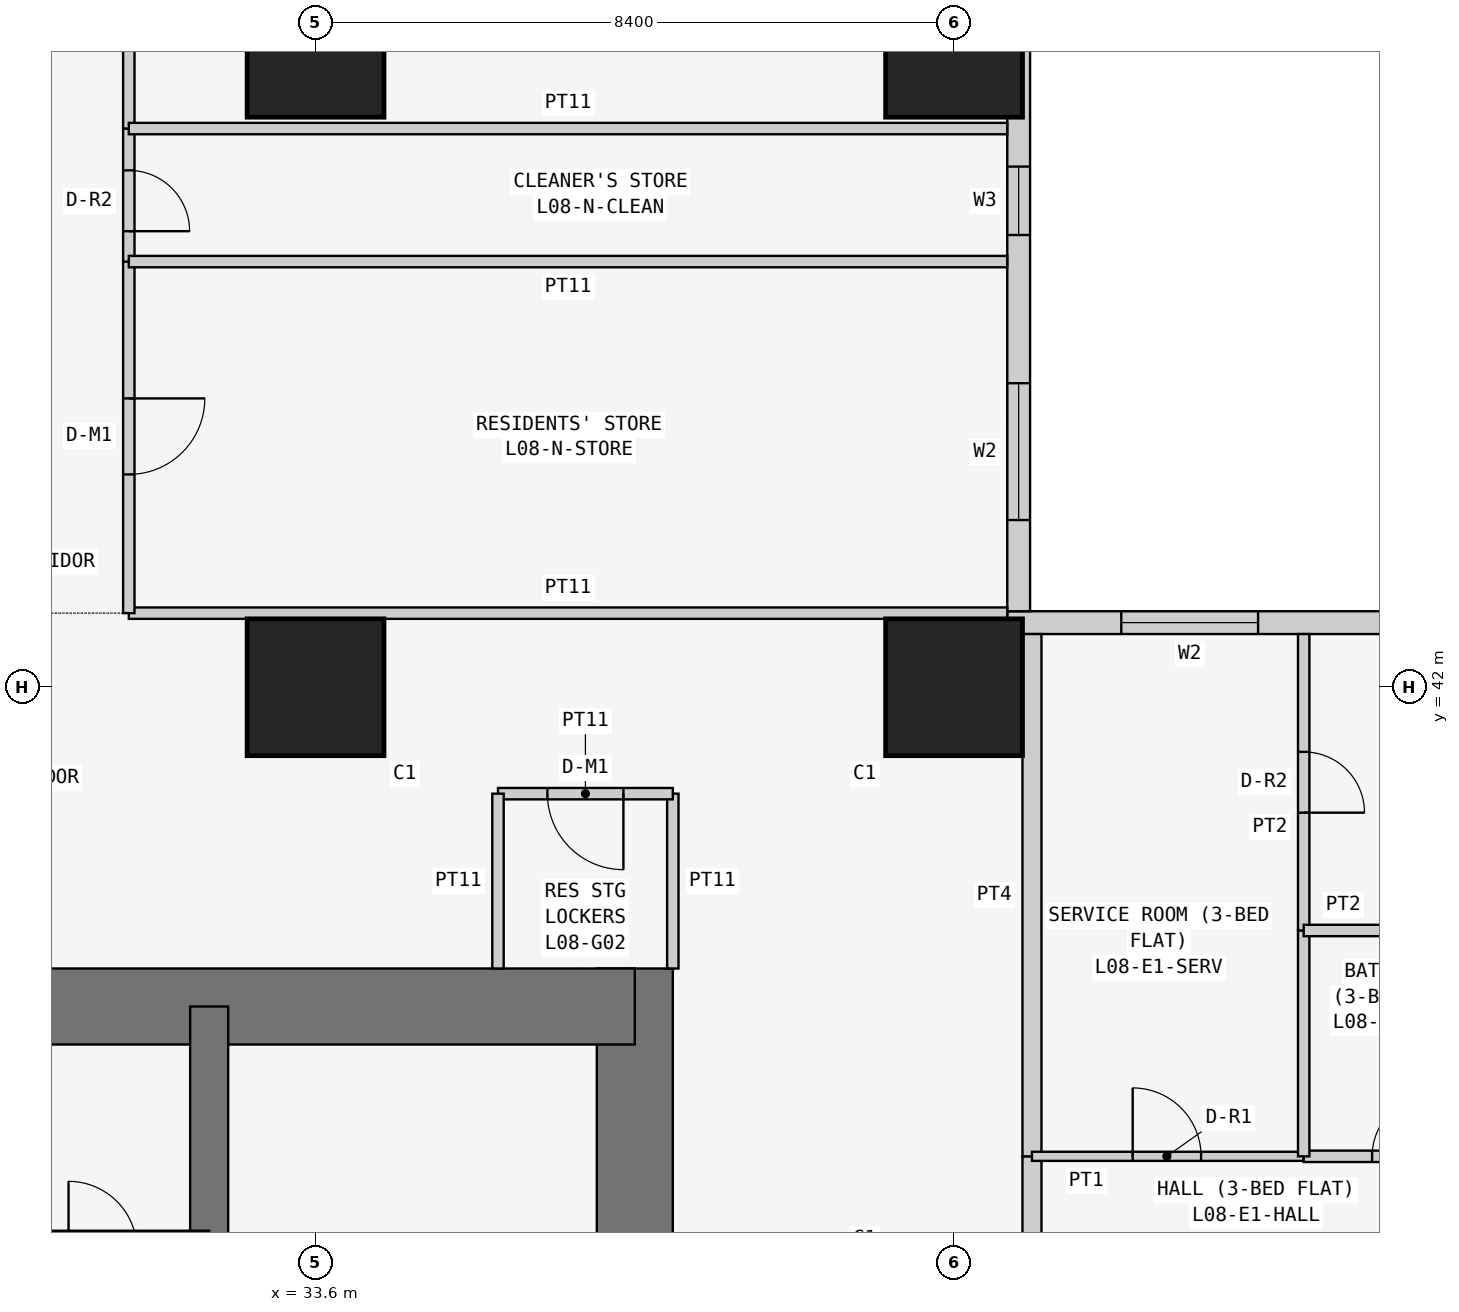
"""IFC4 building model, lengths in metres.
Left out: names, types, materials, properties, quantities, classifications, styles, units other than length and angle.
Written with IfcOpenShell. Run it as: python <this file> out.ifc"""

import sys

from ifc_helpers import new_model, si_unit, direction, frame, frame_2d, origin, origin_2d, place, context, subcontext, project, spatial, rectangle, extrude, element, fill, save


model = new_model("IFC4")
c1 = context("Model", 3, precision=1e-05, world=origin(), true_north=direction((0.0, 1.0)))
c2 = subcontext(c1, "Body", "Model", "MODEL_VIEW")
j1 = project(units=[si_unit("LENGTHUNIT", "METRE"), si_unit("PLANEANGLEUNIT", "RADIAN")], contexts=[c1])
p1 = place(None, origin())
s1 = spatial("IfcSite", under=j1, at=p1, CompositionType="ELEMENT")
p2 = place(p1, origin())
s2 = spatial("IfcBuilding", under=s1, at=p2, CompositionType="ELEMENT")
p3 = place(p2, frame((0.0, 0.0, 38.1)))
s3 = spatial("IfcBuildingStorey", under=s2, at=p3, CompositionType="ELEMENT", Elevation=38.1)
for number, where, z_axis, x_axis in (
    (1, (33.6, 42.0, 0.0), (0.0, 0.0, 1.0), (1.0, 0.0, 0.0)),
    (2, (33.6, 50.4, 0.0), (0.0, 0.0, 1.0), (1.0, 0.0, 0.0)),
    (3, (42.0, 42.0, 0.0), (0.0, 0.0, 1.0), (1.0, 0.0, 0.0)),
    (4, (42.0, 50.4, 0.0), (0.0, 0.0, 1.0), (1.0, 0.0, 0.0)),
):
    element("IfcColumn", number, at=place(p3, frame(where, z_axis=z_axis, x_axis=x_axis)), inside=s3, PredefinedType="COLUMN", context=c2, shape_type="SweptSolid", body=[
        extrude(rectangle(XDim=1.8, YDim=1.8, at=origin_2d()), origin(), (0.0, 0.0, 1.0), 3.6),
    ])
p4 = place(p3, frame((37.8, 21.0, 0.0), z_axis=(0.0, 0.0, 1.0), x_axis=(0.0, 1.0, 0.0)))
e5 = element("IfcWall", 5, at=p4, inside=s3, PredefinedType="SHEAR", context=c2, shape_type="SweptSolid", body=[
    extrude(rectangle(XDim=17.3, YDim=1.0, at=frame_2d((8.65, 0.0))), origin(), (0.0, 0.0, 1.0), 3.6),
])
p5 = place(p4, frame((5.2, 0.0, 0.0)))
e6 = element("IfcOpeningElement", 6, at=p5, cuts=e5, PredefinedType="OPENING", context=c2, shape_type="SweptSolid", body=[
    extrude(rectangle(XDim=1.2, YDim=2.1, at=frame_2d((0.6, 1.05))), frame((0.0, 0.51, 0.0), z_axis=(0.0, -1.0, 0.0), x_axis=(1.0, 0.0, 0.0)), (0.0, 0.0, 1.0), 1.02),
])
p6 = place(p3, frame((37.8, 37.8, 0.0), z_axis=(0.0, 0.0, 1.0), x_axis=(-1.0, 0.0, 0.0)))
e7 = element("IfcWall", 7, at=p6, inside=s3, PredefinedType="SHEAR", context=c2, shape_type="SweptSolid", body=[
    extrude(rectangle(XDim=17.3, YDim=1.0, at=frame_2d((8.65, 0.0))), origin(), (0.0, 0.0, 1.0), 3.6),
])
p7 = place(p3, frame((21.0, 34.6, 0.0), z_axis=(0.0, 0.0, 1.0), x_axis=(1.0, 0.0, 0.0)))
e8 = element("IfcWall", 8, at=p7, inside=s3, PredefinedType="SHEAR", context=c2, shape_type="SweptSolid", body=[
    extrude(rectangle(XDim=11.2, YDim=0.5, at=frame_2d((5.6, 0.0))), origin(), (0.0, 0.0, 1.0), 3.6),
])
p8 = place(p7, frame((9.35, 0.0, 0.0)))
e9 = element("IfcOpeningElement", 9, at=p8, cuts=e8, PredefinedType="OPENING", context=c2, shape_type="SweptSolid", body=[
    extrude(rectangle(XDim=0.9, YDim=2.1, at=frame_2d((0.45, 1.05))), frame((0.0, 0.26, 0.0), z_axis=(0.0, -1.0, 0.0), x_axis=(1.0, 0.0, 0.0)), (0.0, 0.0, 1.0), 0.52),
])
p9 = place(p7, frame((1.0, 0.0, 0.0)))
e10 = element("IfcOpeningElement", 10, at=p9, cuts=e8, PredefinedType="OPENING", context=c2, shape_type="SweptSolid", body=[
    extrude(rectangle(XDim=1.1, YDim=2.1, at=frame_2d((0.55, 1.05))), frame((0.0, 0.26, 0.0), z_axis=(0.0, -1.0, 0.0), x_axis=(1.0, 0.0, 0.0)), (0.0, 0.0, 1.0), 0.52),
])
p10 = place(p7, frame((3.65, 0.0, 0.0)))
e11 = element("IfcOpeningElement", 11, at=p10, cuts=e8, PredefinedType="OPENING", context=c2, shape_type="SweptSolid", body=[
    extrude(rectangle(XDim=1.1, YDim=2.1, at=frame_2d((0.55, 1.05))), frame((0.0, 0.26, 0.0), z_axis=(0.0, -1.0, 0.0), x_axis=(1.0, 0.0, 0.0)), (0.0, 0.0, 1.0), 0.52),
])
p11 = place(p7, frame((6.35, 0.0, 0.0)))
e12 = element("IfcOpeningElement", 12, at=p11, cuts=e8, PredefinedType="OPENING", context=c2, shape_type="SweptSolid", body=[
    extrude(rectangle(XDim=1.3, YDim=2.1, at=frame_2d((0.65, 1.05))), frame((0.0, 0.26, 0.0), z_axis=(0.0, -1.0, 0.0), x_axis=(1.0, 0.0, 0.0)), (0.0, 0.0, 1.0), 0.52),
])
p12 = place(p3, frame((32.2, 29.15, 0.0), z_axis=(0.0, 0.0, 1.0), x_axis=(0.0, 1.0, 0.0)))
e13 = element("IfcWall", 13, at=p12, inside=s3, PredefinedType="SHEAR", context=c2, shape_type="SweptSolid", body=[
    extrude(rectangle(XDim=8.65, YDim=0.5, at=frame_2d((4.325, 0.0))), origin(), (0.0, 0.0, 1.0), 3.6),
])
p13 = place(p3, frame((58.4, 42.85, 0.0), z_axis=(0.0, 0.0, 1.0), x_axis=(-1.0, 0.0, 0.0)))
e14 = element("IfcWall", 14, at=p13, inside=s3, PredefinedType="SOLIDWALL", context=c2, shape_type="SweptSolid", body=[
    extrude(rectangle(XDim=15.7, YDim=0.3, at=frame_2d((7.85, 0.0))), origin(), (0.0, 0.0, 1.0), 3.45),
])
p14 = place(p13, frame((12.4, 0.0, 0.9)))
e15 = element("IfcOpeningElement", 15, at=p14, cuts=e14, PredefinedType="OPENING", context=c2, shape_type="SweptSolid", body=[
    extrude(rectangle(XDim=1.8, YDim=1.5, at=frame_2d((0.9, 0.75))), frame((0.0, 0.16, 0.0), z_axis=(0.0, -1.0, 0.0), x_axis=(1.0, 0.0, 0.0)), (0.0, 0.0, 1.0), 0.32),
])
p15 = place(p13, frame((9.55, 0.0, 1.5)))
e16 = element("IfcOpeningElement", 16, at=p15, cuts=e14, PredefinedType="OPENING", context=c2, shape_type="SweptSolid", body=[
    extrude(rectangle(XDim=0.9, YDim=0.7, at=frame_2d((0.45, 0.35))), frame((0.0, 0.16, 0.0), z_axis=(0.0, -1.0, 0.0), x_axis=(1.0, 0.0, 0.0)), (0.0, 0.0, 1.0), 0.32),
])
p16 = place(p13, frame((5.1, 0.0, 0.9)))
e17 = element("IfcOpeningElement", 17, at=p16, cuts=e14, PredefinedType="OPENING", context=c2, shape_type="SweptSolid", body=[
    extrude(rectangle(XDim=1.8, YDim=1.5, at=frame_2d((0.9, 0.75))), frame((0.0, 0.16, 0.0), z_axis=(0.0, -1.0, 0.0), x_axis=(1.0, 0.0, 0.0)), (0.0, 0.0, 1.0), 0.32),
])
p17 = place(p13, frame((2.0, 0.0, 0.0)))
e18 = element("IfcOpeningElement", 18, at=p17, cuts=e14, PredefinedType="OPENING", context=c2, shape_type="SweptSolid", body=[
    extrude(rectangle(XDim=0.9, YDim=2.4, at=frame_2d((0.45, 1.2))), frame((0.0, 0.16, 0.0), z_axis=(0.0, -1.0, 0.0), x_axis=(1.0, 0.0, 0.0)), (0.0, 0.0, 1.0), 0.32),
])
p18 = place(p13, frame((0.7, 0.0, 0.9)))
e19 = element("IfcOpeningElement", 19, at=p18, cuts=e14, PredefinedType="OPENING", context=c2, shape_type="SweptSolid", body=[
    extrude(rectangle(XDim=1.2, YDim=1.5, at=frame_2d((0.6, 0.75))), frame((0.0, 0.16, 0.0), z_axis=(0.0, -1.0, 0.0), x_axis=(1.0, 0.0, 0.0)), (0.0, 0.0, 1.0), 0.32),
])
p19 = place(p3, frame((42.85, 43.0, 0.0), z_axis=(0.0, 0.0, 1.0), x_axis=(0.0, 1.0, 0.0)))
e20 = element("IfcWall", 20, at=p19, inside=s3, PredefinedType="SOLIDWALL", context=c2, shape_type="SweptSolid", body=[
    extrude(rectangle(XDim=15.4, YDim=0.3, at=frame_2d((7.7, 0.0))), origin(), (0.0, 0.0, 1.0), 3.45),
])
p20 = place(p19, frame((1.2, 0.0, 0.9)))
e21 = element("IfcOpeningElement", 21, at=p20, cuts=e20, PredefinedType="OPENING", context=c2, shape_type="SweptSolid", body=[
    extrude(rectangle(XDim=1.8, YDim=1.5, at=frame_2d((0.9, 0.75))), frame((0.0, 0.16, 0.0), z_axis=(0.0, -1.0, 0.0), x_axis=(1.0, 0.0, 0.0)), (0.0, 0.0, 1.0), 0.32),
])
p21 = place(p19, frame((4.95, 0.0, 1.5)))
e22 = element("IfcOpeningElement", 22, at=p21, cuts=e20, PredefinedType="OPENING", context=c2, shape_type="SweptSolid", body=[
    extrude(rectangle(XDim=0.9, YDim=0.7, at=frame_2d((0.45, 0.35))), frame((0.0, 0.16, 0.0), z_axis=(0.0, -1.0, 0.0), x_axis=(1.0, 0.0, 0.0)), (0.0, 0.0, 1.0), 0.32),
])
p22 = place(p19, frame((8.5, 0.0, 0.9)))
e23 = element("IfcOpeningElement", 23, at=p22, cuts=e20, PredefinedType="OPENING", context=c2, shape_type="SweptSolid", body=[
    extrude(rectangle(XDim=1.8, YDim=1.5, at=frame_2d((0.9, 0.75))), frame((0.0, 0.16, 0.0), z_axis=(0.0, -1.0, 0.0), x_axis=(1.0, 0.0, 0.0)), (0.0, 0.0, 1.0), 0.32),
])
p23 = place(p19, frame((12.5, 0.0, 0.0)))
e24 = element("IfcOpeningElement", 24, at=p23, cuts=e20, PredefinedType="OPENING", context=c2, shape_type="SweptSolid", body=[
    extrude(rectangle(XDim=0.9, YDim=2.4, at=frame_2d((0.45, 1.2))), frame((0.0, 0.16, 0.0), z_axis=(0.0, -1.0, 0.0), x_axis=(1.0, 0.0, 0.0)), (0.0, 0.0, 1.0), 0.32),
])
p24 = place(p19, frame((13.5, 0.0, 0.9)))
e25 = element("IfcOpeningElement", 25, at=p24, cuts=e20, PredefinedType="OPENING", context=c2, shape_type="SweptSolid", body=[
    extrude(rectangle(XDim=1.2, YDim=1.5, at=frame_2d((0.6, 0.75))), frame((0.0, 0.16, 0.0), z_axis=(0.0, -1.0, 0.0), x_axis=(1.0, 0.0, 0.0)), (0.0, 0.0, 1.0), 0.32),
])
p25 = place(p3, frame((38.3, 38.3, 0.0), z_axis=(0.0, 0.0, 1.0), x_axis=(0.0, 1.0, 0.0)))
e26 = element("IfcWall", 26, at=p25, inside=s3, PredefinedType="PARTITIONING", context=c2, shape_type="SweptSolid", body=[
    extrude(rectangle(XDim=2.3, YDim=0.15, at=frame_2d((1.15, 0.0))), origin(), (0.0, 0.0, 1.0), 3.45),
])
p26 = place(p3, frame((38.3, 40.6, 0.0), z_axis=(0.0, 0.0, 1.0), x_axis=(-1.0, 0.0, 0.0)))
e27 = element("IfcWall", 27, at=p26, inside=s3, PredefinedType="PARTITIONING", context=c2, shape_type="SweptSolid", body=[
    extrude(rectangle(XDim=2.3, YDim=0.15, at=frame_2d((1.15, 0.0))), origin(), (0.0, 0.0, 1.0), 3.45),
])
p27 = place(p26, frame((0.65, 0.0, 0.0)))
e28 = element("IfcOpeningElement", 28, at=p27, cuts=e27, PredefinedType="OPENING", context=c2, shape_type="SweptSolid", body=[
    extrude(rectangle(XDim=1.0, YDim=2.1, at=frame_2d((0.5, 1.05))), frame((0.0, 0.085, 0.0), z_axis=(0.0, -1.0, 0.0), x_axis=(1.0, 0.0, 0.0)), (0.0, 0.0, 1.0), 0.17),
])
p28 = place(p3, frame((36.0, 40.6, 0.0), z_axis=(0.0, 0.0, 1.0), x_axis=(0.0, -1.0, 0.0)))
e29 = element("IfcWall", 29, at=p28, inside=s3, PredefinedType="PARTITIONING", context=c2, shape_type="SweptSolid", body=[
    extrude(rectangle(XDim=2.3, YDim=0.15, at=frame_2d((1.15, 0.0))), origin(), (0.0, 0.0, 1.0), 3.45),
])
p29 = place(p3, frame((31.143, 42.975, 0.0), z_axis=(0.0, 0.0, 1.0), x_axis=(1.0, 0.0, 0.0)))
e30 = element("IfcWall", 30, at=p29, inside=s3, PredefinedType="PARTITIONING", context=c2, shape_type="SweptSolid", body=[
    extrude(rectangle(XDim=11.557, YDim=0.15, at=frame_2d((5.778, 0.0))), origin(), (0.0, 0.0, 1.0), 3.45),
])
p30 = place(p3, frame((43.025, 35.829, 0.0), z_axis=(0.0, 0.0, 1.0), x_axis=(0.0, -1.0, 0.0)))
e31 = element("IfcWall", 31, at=p30, inside=s3, PredefinedType="PARTITIONING", context=c2, shape_type="SweptSolid", body=[
    extrude(rectangle(XDim=1.2, YDim=0.25, at=frame_2d((0.6, 0.0))), origin(), (0.0, 0.0, 1.0), 3.45),
])
p31 = place(p3, frame((43.025, 42.7, 0.0), z_axis=(0.0, 0.0, 1.0), x_axis=(0.0, -1.0, 0.0)))
e32 = element("IfcWall", 32, at=p31, inside=s3, PredefinedType="PARTITIONING", context=c2, shape_type="SweptSolid", body=[
    extrude(rectangle(XDim=6.871, YDim=0.25, at=frame_2d((3.436, 0.0))), origin(), (0.0, 0.0, 1.0), 3.45),
])
p32 = place(p3, frame((31.143, 42.975, 0.0), z_axis=(0.0, 0.0, 1.0), x_axis=(0.0, 1.0, 0.0)))
e33 = element("IfcWall", 33, at=p32, inside=s3, PredefinedType="PARTITIONING", context=c2, shape_type="SweptSolid", body=[
    extrude(rectangle(XDim=4.625, YDim=0.15, at=frame_2d((2.312, 0.0))), origin(), (0.0, 0.0, 1.0), 3.45),
])
p33 = place(p32, frame((1.825, 0.0, 0.0)))
e34 = element("IfcOpeningElement", 34, at=p33, cuts=e33, PredefinedType="OPENING", context=c2, shape_type="SweptSolid", body=[
    extrude(rectangle(XDim=1.0, YDim=2.1, at=frame_2d((0.5, 1.05))), frame((0.0, 0.085, 0.0), z_axis=(0.0, -1.0, 0.0), x_axis=(1.0, 0.0, 0.0)), (0.0, 0.0, 1.0), 0.17),
])
p34 = place(p3, frame((31.143, 47.6, 0.0), z_axis=(0.0, 0.0, 1.0), x_axis=(0.0, 1.0, 0.0)))
e35 = element("IfcWall", 35, at=p34, inside=s3, PredefinedType="PARTITIONING", context=c2, shape_type="SweptSolid", body=[
    extrude(rectangle(XDim=1.75, YDim=0.15, at=frame_2d((0.875, 0.0))), origin(), (0.0, 0.0, 1.0), 3.45),
])
p35 = place(p34, frame((0.4, 0.0, 0.0)))
e36 = element("IfcOpeningElement", 36, at=p35, cuts=e35, PredefinedType="OPENING", context=c2, shape_type="SweptSolid", body=[
    extrude(rectangle(XDim=0.8, YDim=2.1, at=frame_2d((0.4, 1.05))), frame((0.0, 0.085, 0.0), z_axis=(0.0, -1.0, 0.0), x_axis=(1.0, 0.0, 0.0)), (0.0, 0.0, 1.0), 0.17),
])
p36 = place(p3, frame((31.143, 49.35, 0.0), z_axis=(0.0, 0.0, 1.0), x_axis=(0.0, 1.0, 0.0)))
e37 = element("IfcWall", 37, at=p36, inside=s3, PredefinedType="PARTITIONING", context=c2, shape_type="SweptSolid", body=[
    extrude(rectangle(XDim=4.25, YDim=0.15, at=frame_2d((2.125, 0.0))), origin(), (0.0, 0.0, 1.0), 3.45),
])
p37 = place(p36, frame((1.55, 0.0, 0.0)))
e38 = element("IfcOpeningElement", 38, at=p37, cuts=e37, PredefinedType="OPENING", context=c2, shape_type="SweptSolid", body=[
    extrude(rectangle(XDim=1.0, YDim=2.1, at=frame_2d((0.5, 1.05))), frame((0.0, 0.085, 0.0), z_axis=(0.0, -1.0, 0.0), x_axis=(1.0, 0.0, 0.0)), (0.0, 0.0, 1.0), 0.17),
])
for number, where, z_axis, x_axis in (
    (39, (42.7, 47.6, 0.0), (0.0, 0.0, 1.0), (-1.0, 0.0, 0.0)),
    (40, (42.7, 49.35, 0.0), (0.0, 0.0, 1.0), (-1.0, 0.0, 0.0)),
):
    element("IfcWall", number, at=place(p3, frame(where, z_axis=z_axis, x_axis=x_axis)), inside=s3, PredefinedType="PARTITIONING", context=c2, shape_type="SweptSolid", body=[
        extrude(rectangle(XDim=11.557, YDim=0.15, at=frame_2d((5.778, 0.0))), origin(), (0.0, 0.0, 1.0), 3.45),
    ])
p38 = place(p3, frame((46.6, 35.829, 0.0), z_axis=(0.0, 0.0, 1.0), x_axis=(-1.0, 0.0, 0.0)))
e41 = element("IfcWall", 41, at=p38, inside=s3, PredefinedType="PARTITIONING", context=c2, shape_type="SweptSolid", body=[
    extrude(rectangle(XDim=3.575, YDim=0.12, at=frame_2d((1.788, 0.0))), origin(), (0.0, 0.0, 1.0), 3.45),
])
p39 = place(p38, frame((1.35, 0.0, 0.0)))
e42 = element("IfcOpeningElement", 42, at=p39, cuts=e41, PredefinedType="OPENING", context=c2, shape_type="SweptSolid", body=[
    extrude(rectangle(XDim=0.9, YDim=2.1, at=frame_2d((0.45, 1.05))), frame((0.0, 0.07, 0.0), z_axis=(0.0, -1.0, 0.0), x_axis=(1.0, 0.0, 0.0)), (0.0, 0.0, 1.0), 0.14),
])
p40 = place(p3, frame((49.2, 35.829, 0.0), z_axis=(0.0, 0.0, 1.0), x_axis=(-1.0, 0.0, 0.0)))
e43 = element("IfcWall", 43, at=p40, inside=s3, PredefinedType="PARTITIONING", context=c2, shape_type="SweptSolid", body=[
    extrude(rectangle(XDim=2.6, YDim=0.15, at=frame_2d((1.3, 0.0))), origin(), (0.0, 0.0, 1.0), 3.45),
])
p41 = place(p40, frame((0.9, 0.0, 0.0)))
e44 = element("IfcOpeningElement", 44, at=p41, cuts=e43, PredefinedType="OPENING", context=c2, shape_type="SweptSolid", body=[
    extrude(rectangle(XDim=0.8, YDim=2.1, at=frame_2d((0.4, 1.05))), frame((0.0, 0.085, 0.0), z_axis=(0.0, -1.0, 0.0), x_axis=(1.0, 0.0, 0.0)), (0.0, 0.0, 1.0), 0.17),
])
p42 = place(p3, frame((46.6, 35.829, 0.0), z_axis=(0.0, 0.0, 1.0), x_axis=(0.0, 1.0, 0.0)))
e45 = element("IfcWall", 45, at=p42, inside=s3, PredefinedType="PARTITIONING", context=c2, shape_type="SweptSolid", body=[
    extrude(rectangle(XDim=2.971, YDim=0.15, at=frame_2d((1.485, 0.0))), origin(), (0.0, 0.0, 1.0), 3.45),
])
p43 = place(p3, frame((46.6, 38.8, 0.0), z_axis=(0.0, 0.0, 1.0), x_axis=(0.0, 1.0, 0.0)))
e46 = element("IfcWall", 46, at=p43, inside=s3, PredefinedType="PARTITIONING", context=c2, shape_type="SweptSolid", body=[
    extrude(rectangle(XDim=3.9, YDim=0.15, at=frame_2d((1.95, 0.0))), origin(), (0.0, 0.0, 1.0), 3.45),
])
p44 = place(p43, frame((1.55, 0.0, 0.0)))
e47 = element("IfcOpeningElement", 47, at=p44, cuts=e46, PredefinedType="OPENING", context=c2, shape_type="SweptSolid", body=[
    extrude(rectangle(XDim=0.8, YDim=2.1, at=frame_2d((0.4, 1.05))), frame((0.0, 0.085, 0.0), z_axis=(0.0, -1.0, 0.0), x_axis=(1.0, 0.0, 0.0)), (0.0, 0.0, 1.0), 0.17),
])
p45 = place(p3, frame((49.2, 38.8, 0.0), z_axis=(0.0, 0.0, 1.0), x_axis=(-1.0, 0.0, 0.0)))
e48 = element("IfcWall", 48, at=p45, inside=s3, PredefinedType="PARTITIONING", context=c2, shape_type="SweptSolid", body=[
    extrude(rectangle(XDim=2.6, YDim=0.15, at=frame_2d((1.3, 0.0))), origin(), (0.0, 0.0, 1.0), 3.45),
])
p46 = place(p20, origin())
e49 = element("IfcWindow", 49, at=p46, inside=s3, PartitioningType="SINGLE_PANEL", PredefinedType="WINDOW", context=c2, shape_type="SweptSolid", body=[
    extrude(rectangle(XDim=1.8, YDim=1.5, at=frame_2d((0.9, 0.75))), frame((0.0, 0.03, 0.0), z_axis=(0.0, -1.0, 0.0), x_axis=(1.0, 0.0, 0.0)), (0.0, 0.0, 1.0), 0.06),
])
fill(e21, e49)
p47 = place(p21, origin())
e50 = element("IfcWindow", 50, at=p47, inside=s3, PartitioningType="SINGLE_PANEL", PredefinedType="WINDOW", context=c2, shape_type="SweptSolid", body=[
    extrude(rectangle(XDim=0.9, YDim=0.7, at=frame_2d((0.45, 0.35))), frame((0.0, 0.03, 0.0), z_axis=(0.0, -1.0, 0.0), x_axis=(1.0, 0.0, 0.0)), (0.0, 0.0, 1.0), 0.06),
])
fill(e22, e50)
p48 = place(p14, origin())
e51 = element("IfcWindow", 51, at=p48, inside=s3, PartitioningType="SINGLE_PANEL", PredefinedType="WINDOW", context=c2, shape_type="SweptSolid", body=[
    extrude(rectangle(XDim=1.8, YDim=1.5, at=frame_2d((0.9, 0.75))), frame((0.0, 0.03, 0.0), z_axis=(0.0, -1.0, 0.0), x_axis=(1.0, 0.0, 0.0)), (0.0, 0.0, 1.0), 0.06),
])
fill(e15, e51)
p49 = place(p27, origin())
e52 = element("IfcDoor", 52, at=p49, inside=s3, OperationType="SINGLE_SWING_LEFT", PredefinedType="DOOR", context=c2, shape_type="SweptSolid", body=[
    extrude(rectangle(XDim=1.0, YDim=2.1, at=frame_2d((0.5, 1.05))), frame((0.0, 0.025, 0.0), z_axis=(0.0, -1.0, 0.0), x_axis=(1.0, 0.0, 0.0)), (0.0, 0.0, 1.0), 0.05),
])
fill(e28, e52)
p50 = place(p33, frame((1.0, 0.0, 0.0), z_axis=(0.0, 0.0, 1.0), x_axis=(-1.0, 0.0, 0.0)))
e53 = element("IfcDoor", 53, at=p50, inside=s3, OperationType="SINGLE_SWING_LEFT", PredefinedType="DOOR", context=c2, shape_type="SweptSolid", body=[
    extrude(rectangle(XDim=1.0, YDim=2.1, at=frame_2d((0.5, 1.05))), frame((0.0, 0.025, 0.0), z_axis=(0.0, -1.0, 0.0), x_axis=(1.0, 0.0, 0.0)), (0.0, 0.0, 1.0), 0.05),
])
fill(e34, e53)
p51 = place(p35, frame((0.8, 0.0, 0.0), z_axis=(0.0, 0.0, 1.0), x_axis=(-1.0, 0.0, 0.0)))
e54 = element("IfcDoor", 54, at=p51, inside=s3, OperationType="SINGLE_SWING_RIGHT", PredefinedType="DOOR", context=c2, shape_type="SweptSolid", body=[
    extrude(rectangle(XDim=0.8, YDim=2.1, at=frame_2d((0.4, 1.05))), frame((0.0, 0.025, 0.0), z_axis=(0.0, -1.0, 0.0), x_axis=(1.0, 0.0, 0.0)), (0.0, 0.0, 1.0), 0.05),
])
fill(e36, e54)
p52 = place(p39, frame((0.9, 0.0, 0.0), z_axis=(0.0, 0.0, 1.0), x_axis=(-1.0, 0.0, 0.0)))
e55 = element("IfcDoor", 55, at=p52, inside=s3, OperationType="SINGLE_SWING_LEFT", PredefinedType="DOOR", context=c2, shape_type="SweptSolid", body=[
    extrude(rectangle(XDim=0.9, YDim=2.1, at=frame_2d((0.45, 1.05))), frame((0.0, 0.025, 0.0), z_axis=(0.0, -1.0, 0.0), x_axis=(1.0, 0.0, 0.0)), (0.0, 0.0, 1.0), 0.05),
])
fill(e42, e55)
p53 = place(p44, frame((0.8, 0.0, 0.0), z_axis=(0.0, 0.0, 1.0), x_axis=(-1.0, 0.0, 0.0)))
e56 = element("IfcDoor", 56, at=p53, inside=s3, OperationType="SINGLE_SWING_RIGHT", PredefinedType="DOOR", context=c2, shape_type="SweptSolid", body=[
    extrude(rectangle(XDim=0.8, YDim=2.1, at=frame_2d((0.4, 1.05))), frame((0.0, 0.025, 0.0), z_axis=(0.0, -1.0, 0.0), x_axis=(1.0, 0.0, 0.0)), (0.0, 0.0, 1.0), 0.05),
])
fill(e47, e56)
p54 = place(p41, frame((0.8, 0.0, 0.0), z_axis=(0.0, 0.0, 1.0), x_axis=(-1.0, 0.0, 0.0)))
e57 = element("IfcDoor", 57, at=p54, inside=s3, OperationType="SINGLE_SWING_RIGHT", PredefinedType="DOOR", context=c2, shape_type="SweptSolid", body=[
    extrude(rectangle(XDim=0.8, YDim=2.1, at=frame_2d((0.4, 1.05))), frame((0.0, 0.025, 0.0), z_axis=(0.0, -1.0, 0.0), x_axis=(1.0, 0.0, 0.0)), (0.0, 0.0, 1.0), 0.05),
])
fill(e44, e57)
save(model, sys.argv[1])
